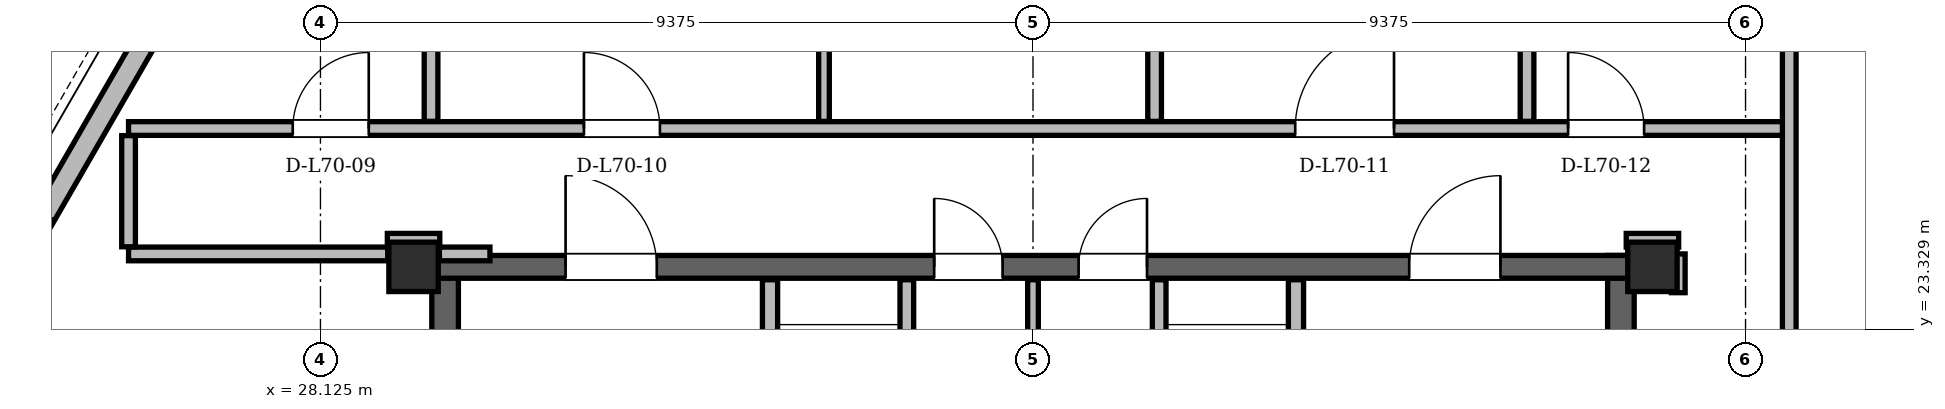
"""IFC4 building model, lengths in metres.
Left out: names, types, materials, properties, quantities, classifications, styles, units other than length and angle.
Written with IfcOpenShell. Run it as: python <this file> out.ifc"""

import sys

from ifc_helpers import new_model, si_unit, direction, frame, frame_2d, origin, origin_2d, place, context, subcontext, project, spatial, rectangle, hollow_rectangle, extrude, element, fill, save


model = new_model("IFC4")
c1 = context("Model", 3, precision=1e-05, world=origin(), true_north=direction((0.0, 1.0)))
c2 = subcontext(c1, "Body", "Model", "MODEL_VIEW")
j1 = project(units=[si_unit("LENGTHUNIT", "METRE"), si_unit("PLANEANGLEUNIT", "RADIAN")], contexts=[c1])
p1 = place(None, origin())
s1 = spatial("IfcSite", under=j1, at=p1, CompositionType="ELEMENT")
p2 = place(p1, origin())
s2 = spatial("IfcBuilding", under=s1, at=p2, CompositionType="ELEMENT")
p3 = place(p2, frame((0.0, 0.0, 265.5)))
s3 = spatial("IfcBuildingStorey", under=s2, at=p3, CompositionType="ELEMENT", Elevation=265.5)
for number, where, z_axis, x_axis in (
    (1, (45.65, 24.15, 0.0), (0.0, 0.0, 1.0), (1.0, 0.0, 0.0)),
    (2, (29.35, 24.15, 0.0), (0.0, 0.0, 1.0), (1.0, 0.0, 0.0)),
):
    element("IfcColumn", number, at=place(p3, frame(where, z_axis=z_axis, x_axis=x_axis)), inside=s3, PredefinedType="COLUMN", context=c2, shape_type="SweptSolid", body=[
        extrude(hollow_rectangle(XDim=0.65, YDim=0.65, WallThickness=0.05, at=origin_2d()), origin(), (0.0, 0.0, 1.0), 3.9),
    ])
for number, where, z_axis, x_axis in (
    (3, (29.765, 11.0, 0.0), (0.0, 0.0, 1.0), (0.0, 1.0, 0.0)),
    (4, (45.235, 11.0, 0.0), (0.0, 0.0, 1.0), (0.0, 1.0, 0.0)),
):
    element("IfcWall", number, at=place(p3, frame(where, z_axis=z_axis, x_axis=x_axis)), inside=s3, PredefinedType="SHEAR", context=c2, shape_type="SweptSolid", body=[
        extrude(rectangle(XDim=13.3, YDim=0.35, at=frame_2d((6.65, 0.0))), origin(), (0.0, 0.0, 1.0), 3.68),
    ])
p4 = place(p3, frame((29.65, 24.15, 0.0), z_axis=(0.0, 0.0, 1.0), x_axis=(1.0, 0.0, 0.0)))
e5 = element("IfcWall", 5, at=p4, inside=s3, PredefinedType="SHEAR", context=c2, shape_type="SweptSolid", body=[
    extrude(rectangle(XDim=15.7, YDim=0.3, at=frame_2d((7.85, 0.0))), origin(), (0.0, 0.0, 1.0), 3.68),
])
p5 = place(p4, frame((1.7, 0.0, 0.0)))
e6 = element("IfcOpeningElement", 6, at=p5, cuts=e5, PredefinedType="OPENING", context=c2, shape_type="SweptSolid", body=[
    extrude(rectangle(XDim=1.2, YDim=2.2, at=frame_2d((0.6, 1.1))), frame((0.0, 0.15, 0.0), z_axis=(0.0, -1.0, 0.0), x_axis=(1.0, 0.0, 0.0)), (0.0, 0.0, 1.0), 0.3),
])
p6 = place(p4, frame((12.8, 0.0, 0.0)))
e7 = element("IfcOpeningElement", 7, at=p6, cuts=e5, PredefinedType="OPENING", context=c2, shape_type="SweptSolid", body=[
    extrude(rectangle(XDim=1.2, YDim=2.2, at=frame_2d((0.6, 1.1))), frame((0.0, 0.15, 0.0), z_axis=(0.0, -1.0, 0.0), x_axis=(1.0, 0.0, 0.0)), (0.0, 0.0, 1.0), 0.3),
])
p7 = place(p4, frame((6.55, 0.0, 0.0)))
e8 = element("IfcOpeningElement", 8, at=p7, cuts=e5, PredefinedType="OPENING", context=c2, shape_type="SweptSolid", body=[
    extrude(rectangle(XDim=0.9, YDim=2.05, at=frame_2d((0.45, 1.025))), frame((0.0, 0.15, 0.0), z_axis=(0.0, -1.0, 0.0), x_axis=(1.0, 0.0, 0.0)), (0.0, 0.0, 1.0), 0.3),
])
p8 = place(p4, frame((8.45, 0.0, 0.0)))
e9 = element("IfcOpeningElement", 9, at=p8, cuts=e5, PredefinedType="OPENING", context=c2, shape_type="SweptSolid", body=[
    extrude(rectangle(XDim=0.9, YDim=2.05, at=frame_2d((0.45, 1.025))), frame((0.0, 0.15, 0.0), z_axis=(0.0, -1.0, 0.0), x_axis=(1.0, 0.0, 0.0)), (0.0, 0.0, 1.0), 0.3),
])
p9 = place(p3, frame((35.012, 43.042, 0.0), z_axis=(0.0, 0.0, 1.0), x_axis=(-0.49999932964, -0.866025790817, 0.0)))
e10 = element("IfcWall", 10, at=p9, inside=s3, PredefinedType="SOLIDWALL", context=c2, shape_type="SweptSolid", body=[
    extrude(rectangle(XDim=37.248, YDim=0.29, at=frame_2d((18.624, 0.0))), origin(), (0.0, 0.0, 1.0), 3.058),
])
p10 = place(p9, frame((3.639, 0.0, 0.0)))
e11 = element("IfcOpeningElement", 11, at=p10, cuts=e10, PredefinedType="OPENING", context=c2, shape_type="SweptSolid", body=[
    extrude(rectangle(XDim=1.5, YDim=2.2, at=frame_2d((0.75, 1.1))), frame((0.0, 0.145, 0.0), z_axis=(0.0, -1.0, 0.0), x_axis=(1.0, 0.0, 0.0)), (0.0, 0.0, 1.0), 0.29),
])
p11 = place(p9, frame((27.504, 0.0, 0.0)))
e12 = element("IfcOpeningElement", 12, at=p11, cuts=e10, PredefinedType="OPENING", context=c2, shape_type="SweptSolid", body=[
    extrude(rectangle(XDim=1.5, YDim=2.2, at=frame_2d((0.75, 1.1))), frame((0.0, 0.145, 0.0), z_axis=(0.0, -1.0, 0.0), x_axis=(1.0, 0.0, 0.0)), (0.0, 0.0, 1.0), 0.29),
])
p12 = place(p9, frame((35.135, 0.0, 0.85)))
e13 = element("IfcOpeningElement", 13, at=p12, cuts=e10, PredefinedType="OPENING", context=c2, shape_type="SweptSolid", body=[
    extrude(rectangle(XDim=1.2, YDim=1.48, at=frame_2d((0.6, 0.74))), frame((0.0, 0.145, 0.0), z_axis=(0.0, -1.0, 0.0), x_axis=(1.0, 0.0, 0.0)), (0.0, 0.0, 1.0), 0.29),
])
p13 = place(p9, frame((32.321, 0.0, 0.85)))
e14 = element("IfcOpeningElement", 14, at=p13, cuts=e10, PredefinedType="OPENING", context=c2, shape_type="SweptSolid", body=[
    extrude(rectangle(XDim=2.0, YDim=1.8, at=frame_2d((1.0, 0.9))), frame((0.0, 0.145, 0.0), z_axis=(0.0, -1.0, 0.0), x_axis=(1.0, 0.0, 0.0)), (0.0, 0.0, 1.0), 0.29),
])
p14 = place(p9, frame((12.691, 0.0, 0.85)))
e15 = element("IfcOpeningElement", 15, at=p14, cuts=e10, PredefinedType="OPENING", context=c2, shape_type="SweptSolid", body=[
    extrude(rectangle(XDim=2.0, YDim=1.8, at=frame_2d((1.0, 0.9))), frame((0.0, 0.145, 0.0), z_axis=(0.0, -1.0, 0.0), x_axis=(1.0, 0.0, 0.0)), (0.0, 0.0, 1.0), 0.29),
])
p15 = place(p9, frame((21.019, 0.0, 0.85)))
e16 = element("IfcOpeningElement", 16, at=p15, cuts=e10, PredefinedType="OPENING", context=c2, shape_type="SweptSolid", body=[
    extrude(rectangle(XDim=1.4, YDim=1.6, at=frame_2d((0.7, 0.8))), frame((0.0, 0.145, 0.0), z_axis=(0.0, -1.0, 0.0), x_axis=(1.0, 0.0, 0.0)), (0.0, 0.0, 1.0), 0.29),
])
p16 = place(p9, frame((1.529, 0.0, 0.85)))
e17 = element("IfcOpeningElement", 17, at=p16, cuts=e10, PredefinedType="OPENING", context=c2, shape_type="SweptSolid", body=[
    extrude(rectangle(XDim=1.2, YDim=1.48, at=frame_2d((0.6, 0.74))), frame((0.0, 0.145, 0.0), z_axis=(0.0, -1.0, 0.0), x_axis=(1.0, 0.0, 0.0)), (0.0, 0.0, 1.0), 0.29),
])
p17 = place(p9, frame((7.904, 0.0, 0.85)))
e18 = element("IfcOpeningElement", 18, at=p17, cuts=e10, PredefinedType="OPENING", context=c2, shape_type="SweptSolid", body=[
    extrude(rectangle(XDim=2.0, YDim=1.8, at=frame_2d((1.0, 0.9))), frame((0.0, 0.145, 0.0), z_axis=(0.0, -1.0, 0.0), x_axis=(1.0, 0.0, 0.0)), (0.0, 0.0, 1.0), 0.29),
])
p18 = place(p3, frame((34.04, 19.48, 0.0), z_axis=(0.0, 0.0, 1.0), x_axis=(0.0, 1.0, 0.0)))
e19 = element("IfcWall", 19, at=p18, inside=s3, PredefinedType="PARTITIONING", context=c2, shape_type="SweptSolid", body=[
    extrude(rectangle(XDim=4.5, YDim=0.2, at=frame_2d((2.25, 0.0))), origin(), (0.0, 0.0, 1.0), 3.68),
])
p19 = place(p18, frame((2.12, 0.0, 0.0)))
e20 = element("IfcOpeningElement", 20, at=p19, cuts=e19, PredefinedType="OPENING", context=c2, shape_type="SweptSolid", body=[
    extrude(rectangle(XDim=1.1, YDim=2.2, at=frame_2d((0.55, 1.1))), frame((0.0, 0.1, 0.0), z_axis=(0.0, -1.0, 0.0), x_axis=(1.0, 0.0, 0.0)), (0.0, 0.0, 1.0), 0.2),
])
p20 = place(p3, frame((35.84, 20.96, 0.0), z_axis=(0.0, 0.0, 1.0), x_axis=(0.0, 1.0, 0.0)))
e21 = element("IfcWall", 21, at=p20, inside=s3, PredefinedType="PARTITIONING", context=c2, shape_type="SweptSolid", body=[
    extrude(rectangle(XDim=3.02, YDim=0.18, at=frame_2d((1.51, 0.0))), origin(), (0.0, 0.0, 1.0), 3.68),
])
p21 = place(p3, frame((40.96, 19.48, 0.0), z_axis=(0.0, 0.0, 1.0), x_axis=(0.0, 1.0, 0.0)))
e22 = element("IfcWall", 22, at=p21, inside=s3, PredefinedType="PARTITIONING", context=c2, shape_type="SweptSolid", body=[
    extrude(rectangle(XDim=4.5, YDim=0.2, at=frame_2d((2.25, 0.0))), origin(), (0.0, 0.0, 1.0), 3.68),
])
p22 = place(p21, frame((2.12, 0.0, 0.0)))
e23 = element("IfcOpeningElement", 23, at=p22, cuts=e22, PredefinedType="OPENING", context=c2, shape_type="SweptSolid", body=[
    extrude(rectangle(XDim=1.1, YDim=2.2, at=frame_2d((0.55, 1.1))), frame((0.0, 0.1, 0.0), z_axis=(0.0, -1.0, 0.0), x_axis=(1.0, 0.0, 0.0)), (0.0, 0.0, 1.0), 0.2),
])
p23 = place(p3, frame((39.16, 20.96, 0.0), z_axis=(0.0, 0.0, 1.0), x_axis=(0.0, 1.0, 0.0)))
e24 = element("IfcWall", 24, at=p23, inside=s3, PredefinedType="PARTITIONING", context=c2, shape_type="SweptSolid", body=[
    extrude(rectangle(XDim=3.02, YDim=0.18, at=frame_2d((1.51, 0.0))), origin(), (0.0, 0.0, 1.0), 3.68),
])
p24 = place(p3, frame((37.5, 21.06, 0.0), z_axis=(0.0, 0.0, 1.0), x_axis=(0.0, 1.0, 0.0)))
e25 = element("IfcWall", 25, at=p24, inside=s3, PredefinedType="PARTITIONING", context=c2, shape_type="SweptSolid", body=[
    extrude(rectangle(XDim=2.92, YDim=0.14, at=frame_2d((1.46, 0.0))), origin(), (0.0, 0.0, 1.0), 3.68),
])
p25 = place(p3, frame((25.6, 24.32, 0.0), z_axis=(0.0, 0.0, 1.0), x_axis=(1.0, 0.0, 0.0)))
e26 = element("IfcWall", 26, at=p25, inside=s3, PredefinedType="PARTITIONING", context=c2, shape_type="SweptSolid", body=[
    extrude(rectangle(XDim=3.41, YDim=0.18, at=frame_2d((1.705, 0.0))), origin(), (0.0, 0.0, 1.0), 3.68),
])
p26 = place(p3, frame((29.69, 24.32, 0.0), z_axis=(0.0, 0.0, 1.0), x_axis=(1.0, 0.0, 0.0)))
e27 = element("IfcWall", 27, at=p26, inside=s3, PredefinedType="PARTITIONING", context=c2, shape_type="SweptSolid", body=[
    extrude(rectangle(XDim=0.665, YDim=0.18, at=frame_2d((0.333, 0.0))), origin(), (0.0, 0.0, 1.0), 2.82),
])
for number, where, z_axis, x_axis in (
    (28, (29.005, 24.5, 0.0), (0.0, 0.0, 1.0), (1.0, 0.0, 0.0)),
    (29, (45.305, 24.5, 0.0), (0.0, 0.0, 1.0), (1.0, 0.0, 0.0)),
):
    element("IfcWall", number, at=place(p3, frame(where, z_axis=z_axis, x_axis=x_axis)), inside=s3, PredefinedType="PARTITIONING", context=c2, shape_type="SweptSolid", body=[
        extrude(rectangle(XDim=0.69, YDim=0.18, at=frame_2d((0.345, 0.0))), origin(), (0.0, 0.0, 1.0), 3.266),
    ])
p27 = place(p3, frame((25.6, 25.97, 0.0), z_axis=(0.0, 0.0, 1.0), x_axis=(1.0, 0.0, 0.0)))
e30 = element("IfcWall", 30, at=p27, inside=s3, PredefinedType="PARTITIONING", context=c2, shape_type="SweptSolid", body=[
    extrude(rectangle(XDim=21.85, YDim=0.18, at=frame_2d((10.925, 0.0))), origin(), (0.0, 0.0, 1.0), 3.266),
])
p28 = place(p27, frame((2.16, 0.0, 0.0)))
e31 = element("IfcOpeningElement", 31, at=p28, cuts=e30, PredefinedType="OPENING", context=c2, shape_type="SweptSolid", body=[
    extrude(rectangle(XDim=1.0, YDim=2.18, at=frame_2d((0.5, 1.09))), frame((0.0, 0.09, 0.0), z_axis=(0.0, -1.0, 0.0), x_axis=(1.0, 0.0, 0.0)), (0.0, 0.0, 1.0), 0.18),
])
p29 = place(p27, frame((5.991, 0.0, 0.0)))
e32 = element("IfcOpeningElement", 32, at=p29, cuts=e30, PredefinedType="OPENING", context=c2, shape_type="SweptSolid", body=[
    extrude(rectangle(XDim=1.0, YDim=2.18, at=frame_2d((0.5, 1.09))), frame((0.0, 0.09, 0.0), z_axis=(0.0, -1.0, 0.0), x_axis=(1.0, 0.0, 0.0)), (0.0, 0.0, 1.0), 0.18),
])
p30 = place(p27, frame((15.35, 0.0, 0.0)))
e33 = element("IfcOpeningElement", 33, at=p30, cuts=e30, PredefinedType="OPENING", context=c2, shape_type="SweptSolid", body=[
    extrude(rectangle(XDim=1.3, YDim=2.2, at=frame_2d((0.65, 1.1))), frame((0.0, 0.09, 0.0), z_axis=(0.0, -1.0, 0.0), x_axis=(1.0, 0.0, 0.0)), (0.0, 0.0, 1.0), 0.18),
])
p31 = place(p27, frame((18.94, 0.0, 0.0)))
e34 = element("IfcOpeningElement", 34, at=p31, cuts=e30, PredefinedType="OPENING", context=c2, shape_type="SweptSolid", body=[
    extrude(rectangle(XDim=1.0, YDim=2.18, at=frame_2d((0.5, 1.09))), frame((0.0, 0.09, 0.0), z_axis=(0.0, -1.0, 0.0), x_axis=(1.0, 0.0, 0.0)), (0.0, 0.0, 1.0), 0.18),
])
p32 = place(p3, frame((25.6, 24.414, 0.0), z_axis=(0.0, 0.0, 1.0), x_axis=(0.0, 1.0, 0.0)))
e35 = element("IfcWall", 35, at=p32, inside=s3, PredefinedType="PARTITIONING", context=c2, shape_type="SweptSolid", body=[
    extrude(rectangle(XDim=1.462, YDim=0.18, at=frame_2d((0.731, 0.0))), origin(), (0.0, 0.0, 1.0), 3.68),
])
p33 = place(p3, frame((29.58, 26.064, 0.0), z_axis=(0.0, 0.0, 1.0), x_axis=(0.0, 1.0, 0.0)))
e36 = element("IfcWall", 36, at=p33, inside=s3, PredefinedType="PARTITIONING", context=c2, shape_type="SweptSolid", body=[
    extrude(rectangle(XDim=7.088, YDim=0.18, at=frame_2d((3.544, 0.0))), origin(), (0.0, 0.0, 1.0), 3.68),
])
p34 = place(p3, frame((34.75, 26.064, 0.0), z_axis=(0.0, 0.0, 1.0), x_axis=(0.0, 1.0, 0.0)))
e37 = element("IfcWall", 37, at=p34, inside=s3, PredefinedType="PARTITIONING", context=c2, shape_type="SweptSolid", body=[
    extrude(rectangle(XDim=16.225, YDim=0.14, at=frame_2d((8.113, 0.0))), origin(), (0.0, 0.0, 1.0), 3.266),
])
p35 = place(p34, frame((1.254, 0.0, 0.0)))
e38 = element("IfcOpeningElement", 38, at=p35, cuts=e37, PredefinedType="OPENING", context=c2, shape_type="SweptSolid", body=[
    extrude(rectangle(XDim=0.92, YDim=2.12, at=frame_2d((0.46, 1.06))), frame((0.0, 0.07, 0.0), z_axis=(0.0, -1.0, 0.0), x_axis=(1.0, 0.0, 0.0)), (0.0, 0.0, 1.0), 0.14),
])
p36 = place(p34, frame((4.809, 0.0, 0.0)))
e39 = element("IfcOpeningElement", 39, at=p36, cuts=e37, PredefinedType="OPENING", context=c2, shape_type="SweptSolid", body=[
    extrude(rectangle(XDim=0.92, YDim=2.12, at=frame_2d((0.46, 1.06))), frame((0.0, 0.07, 0.0), z_axis=(0.0, -1.0, 0.0), x_axis=(1.0, 0.0, 0.0)), (0.0, 0.0, 1.0), 0.14),
])
p37 = place(p34, frame((7.858, 0.0, 0.0)))
e40 = element("IfcOpeningElement", 40, at=p37, cuts=e37, PredefinedType="OPENING", context=c2, shape_type="SweptSolid", body=[
    extrude(rectangle(XDim=0.95, YDim=2.1, at=frame_2d((0.475, 1.05))), frame((0.0, 0.07, 0.0), z_axis=(0.0, -1.0, 0.0), x_axis=(1.0, 0.0, 0.0)), (0.0, 0.0, 1.0), 0.14),
])
p38 = place(p34, frame((10.431, 0.0, 0.0)))
e41 = element("IfcOpeningElement", 41, at=p38, cuts=e37, PredefinedType="OPENING", context=c2, shape_type="SweptSolid", body=[
    extrude(rectangle(XDim=0.95, YDim=2.1, at=frame_2d((0.475, 1.05))), frame((0.0, 0.07, 0.0), z_axis=(0.0, -1.0, 0.0), x_axis=(1.0, 0.0, 0.0)), (0.0, 0.0, 1.0), 0.14),
])
p39 = place(p34, frame((12.758, 0.0, 0.0)))
e42 = element("IfcOpeningElement", 42, at=p39, cuts=e37, PredefinedType="OPENING", context=c2, shape_type="SweptSolid", body=[
    extrude(rectangle(XDim=0.95, YDim=2.1, at=frame_2d((0.475, 1.05))), frame((0.0, 0.07, 0.0), z_axis=(0.0, -1.0, 0.0), x_axis=(1.0, 0.0, 0.0)), (0.0, 0.0, 1.0), 0.14),
])
p40 = place(p34, frame((14.683, 0.0, 0.0)))
e43 = element("IfcOpeningElement", 43, at=p40, cuts=e37, PredefinedType="OPENING", context=c2, shape_type="SweptSolid", body=[
    extrude(rectangle(XDim=0.88, YDim=2.08, at=frame_2d((0.44, 1.04))), frame((0.0, 0.07, 0.0), z_axis=(0.0, -1.0, 0.0), x_axis=(1.0, 0.0, 0.0)), (0.0, 0.0, 1.0), 0.14),
])
p41 = place(p3, frame((39.1, 26.064, 0.0), z_axis=(0.0, 0.0, 1.0), x_axis=(0.0, 1.0, 0.0)))
e44 = element("IfcWall", 44, at=p41, inside=s3, PredefinedType="PARTITIONING", context=c2, shape_type="SweptSolid", body=[
    extrude(rectangle(XDim=16.829, YDim=0.18, at=frame_2d((8.414, 0.0))), origin(), (0.0, 0.0, 1.0), 3.68),
])
p42 = place(p3, frame((44.0, 26.064, 0.0), z_axis=(0.0, 0.0, 1.0), x_axis=(0.0, 1.0, 0.0)))
e45 = element("IfcWall", 45, at=p42, inside=s3, PredefinedType="PARTITIONING", context=c2, shape_type="SweptSolid", body=[
    extrude(rectangle(XDim=4.312, YDim=0.18, at=frame_2d((2.156, 0.0))), origin(), (0.0, 0.0, 1.0), 3.266),
])
p43 = place(p3, frame((45.99, 23.81, 0.0), z_axis=(0.0, 0.0, 1.0), x_axis=(0.0, 1.0, 0.0)))
e46 = element("IfcWall", 46, at=p43, inside=s3, PredefinedType="PARTITIONING", context=c2, shape_type="SweptSolid", body=[
    extrude(rectangle(XDim=0.51, YDim=0.18, at=frame_2d((0.255, 0.0))), origin(), (0.0, 0.0, 1.0), 3.68),
])
p44 = place(p3, frame((47.45, 6.624, 0.0), z_axis=(0.0, 0.0, 1.0), x_axis=(0.0, 1.0, 0.0)))
e47 = element("IfcWall", 47, at=p44, inside=s3, PredefinedType="PARTITIONING", context=c2, shape_type="SweptSolid", body=[
    extrude(rectangle(XDim=23.195, YDim=0.18, at=frame_2d((11.597, 0.0))), origin(), (0.0, 0.0, 1.0), 3.058),
])
p45 = place(p44, frame((10.437, 0.0, 0.0)))
e48 = element("IfcOpeningElement", 48, at=p45, cuts=e47, PredefinedType="OPENING", context=c2, shape_type="SweptSolid", body=[
    extrude(rectangle(XDim=1.0, YDim=2.18, at=frame_2d((0.5, 1.09))), frame((0.0, 0.09, 0.0), z_axis=(0.0, -1.0, 0.0), x_axis=(1.0, 0.0, 0.0)), (0.0, 0.0, 1.0), 0.18),
])
p46 = place(p5, origin())
e49 = element("IfcDoor", 49, at=p46, inside=s3, OperationType="SINGLE_SWING_LEFT", PredefinedType="DOOR", context=c2, shape_type="SweptSolid", body=[
    extrude(rectangle(XDim=1.2, YDim=2.2, at=frame_2d((0.6, 1.1))), frame((0.0, 0.025, 0.0), z_axis=(0.0, -1.0, 0.0), x_axis=(1.0, 0.0, 0.0)), (0.0, 0.0, 1.0), 0.05),
])
fill(e6, e49)
p47 = place(p6, origin())
e50 = element("IfcDoor", 50, at=p47, inside=s3, OperationType="SINGLE_SWING_RIGHT", PredefinedType="DOOR", context=c2, shape_type="SweptSolid", body=[
    extrude(rectangle(XDim=1.2, YDim=2.2, at=frame_2d((0.6, 1.1))), frame((0.0, 0.025, 0.0), z_axis=(0.0, -1.0, 0.0), x_axis=(1.0, 0.0, 0.0)), (0.0, 0.0, 1.0), 0.05),
])
fill(e7, e50)
p48 = place(p7, origin())
e51 = element("IfcDoor", 51, at=p48, inside=s3, OperationType="SINGLE_SWING_LEFT", PredefinedType="DOOR", context=c2, shape_type="SweptSolid", body=[
    extrude(rectangle(XDim=0.9, YDim=2.05, at=frame_2d((0.45, 1.025))), frame((0.0, 0.025, 0.0), z_axis=(0.0, -1.0, 0.0), x_axis=(1.0, 0.0, 0.0)), (0.0, 0.0, 1.0), 0.05),
])
fill(e8, e51)
p49 = place(p8, origin())
e52 = element("IfcDoor", 52, at=p49, inside=s3, OperationType="SINGLE_SWING_RIGHT", PredefinedType="DOOR", context=c2, shape_type="SweptSolid", body=[
    extrude(rectangle(XDim=0.9, YDim=2.05, at=frame_2d((0.45, 1.025))), frame((0.0, 0.025, 0.0), z_axis=(0.0, -1.0, 0.0), x_axis=(1.0, 0.0, 0.0)), (0.0, 0.0, 1.0), 0.05),
])
fill(e9, e52)
p50 = place(p28, origin())
e53 = element("IfcDoor", 53, at=p50, inside=s3, OperationType="SINGLE_SWING_RIGHT", PredefinedType="DOOR", context=c2, shape_type="SweptSolid", body=[
    extrude(rectangle(XDim=1.0, YDim=2.18, at=frame_2d((0.5, 1.09))), frame((0.0, 0.025, 0.0), z_axis=(0.0, -1.0, 0.0), x_axis=(1.0, 0.0, 0.0)), (0.0, 0.0, 1.0), 0.05),
])
fill(e31, e53)
p51 = place(p29, origin())
e54 = element("IfcDoor", 54, at=p51, inside=s3, OperationType="SINGLE_SWING_LEFT", PredefinedType="DOOR", context=c2, shape_type="SweptSolid", body=[
    extrude(rectangle(XDim=1.0, YDim=2.18, at=frame_2d((0.5, 1.09))), frame((0.0, 0.025, 0.0), z_axis=(0.0, -1.0, 0.0), x_axis=(1.0, 0.0, 0.0)), (0.0, 0.0, 1.0), 0.05),
])
fill(e32, e54)
p52 = place(p30, origin())
e55 = element("IfcDoor", 55, at=p52, inside=s3, OperationType="SINGLE_SWING_RIGHT", PredefinedType="DOOR", context=c2, shape_type="SweptSolid", body=[
    extrude(rectangle(XDim=1.3, YDim=2.2, at=frame_2d((0.65, 1.1))), frame((0.0, 0.025, 0.0), z_axis=(0.0, -1.0, 0.0), x_axis=(1.0, 0.0, 0.0)), (0.0, 0.0, 1.0), 0.05),
])
fill(e33, e55)
p53 = place(p31, origin())
e56 = element("IfcDoor", 56, at=p53, inside=s3, OperationType="SINGLE_SWING_LEFT", PredefinedType="DOOR", context=c2, shape_type="SweptSolid", body=[
    extrude(rectangle(XDim=1.0, YDim=2.18, at=frame_2d((0.5, 1.09))), frame((0.0, 0.025, 0.0), z_axis=(0.0, -1.0, 0.0), x_axis=(1.0, 0.0, 0.0)), (0.0, 0.0, 1.0), 0.05),
])
fill(e34, e56)
save(model, sys.argv[1])
